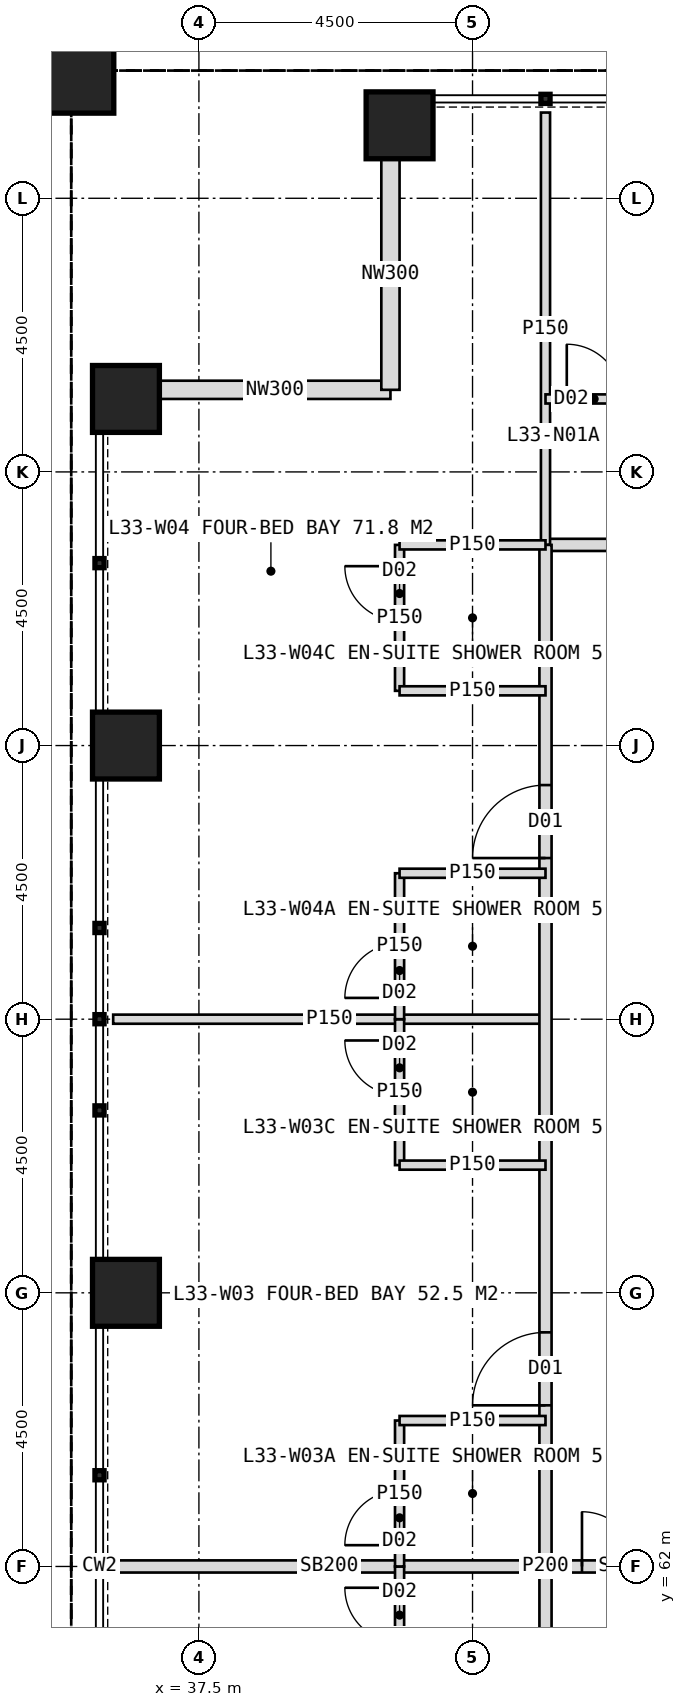
"""IFC4 building model, lengths in metres.
Left out: names, types, materials, properties, quantities, classifications, styles, units other than length and angle.
Written with IfcOpenShell. Run it as: python <this file> out.ifc"""

import sys

from ifc_helpers import new_model, si_unit, direction, frame, frame_2d, origin, origin_2d, place, context, subcontext, project, spatial, rectangle, hollow_rectangle, extrude, element, fill, save


model = new_model("IFC4")
c1 = context("Model", 3, precision=1e-05, world=origin(), true_north=direction((0.0, 1.0)))
c2 = subcontext(c1, "Body", "Model", "MODEL_VIEW")
j1 = project(units=[si_unit("LENGTHUNIT", "METRE"), si_unit("PLANEANGLEUNIT", "RADIAN")], contexts=[c1])
p1 = place(None, origin())
s1 = spatial("IfcSite", under=j1, at=p1, CompositionType="ELEMENT")
p2 = place(p1, origin())
s2 = spatial("IfcBuilding", under=s1, at=p2, CompositionType="ELEMENT")
p3 = place(p2, frame((0.0, 0.0, 140.0)))
s3 = spatial("IfcBuildingStorey", under=s2, at=p3, CompositionType="ELEMENT", Elevation=140.0)
for number, where, z_axis, x_axis in (
    (1, (40.8, 85.7, 0.0), (0.0, 0.0, 1.0), (1.0, 0.0, 0.0)),
    (2, (36.3, 66.5, 0.0), (0.0, 0.0, 1.0), (1.0, 0.0, 0.0)),
    (3, (36.3, 75.5, 0.0), (0.0, 0.0, 1.0), (1.0, 0.0, 0.0)),
    (4, (36.3, 81.2, 0.0), (0.0, 0.0, 1.0), (1.0, 0.0, 0.0)),
):
    element("IfcColumn", number, at=place(p3, frame(where, z_axis=z_axis, x_axis=x_axis)), inside=s3, PredefinedType="COLUMN", context=c2, shape_type="SweptSolid", body=[
        extrude(hollow_rectangle(XDim=1.1, YDim=1.1, WallThickness=0.1, at=origin_2d()), origin(), (0.0, 0.0, 1.0), 4.0),
    ])
p4 = place(p3, frame((35.4, 86.6, 0.0), z_axis=(0.0, 0.0, 1.0), x_axis=(1.0, 0.0, 0.0)))
e5 = element("IfcColumn", 5, at=p4, inside=s3, PredefinedType="COLUMN", context=c2, shape_type="SweptSolid", body=[
    extrude(hollow_rectangle(XDim=1.4, YDim=1.4, WallThickness=0.08, at=origin_2d()), origin(), (0.0, 0.0, 1.0), 4.0),
])
for number, where, z_axis, x_axis in (
    (6, (36.85, 81.35, 0.0), (0.0, 0.0, 1.0), (1.0, 0.0, 0.0)),
    (7, (40.65, 81.35, 0.0), (0.0, 0.0, 1.0), (0.0, 1.0, 0.0)),
):
    element("IfcWall", number, at=place(p3, frame(where, z_axis=z_axis, x_axis=x_axis)), inside=s3, PredefinedType="ELEMENTEDWALL", context=c2, shape_type="SweptSolid", body=[
        extrude(rectangle(XDim=3.8, YDim=0.3, at=frame_2d((1.9, 0.0))), origin(), (0.0, 0.0, 1.0), 4.0),
    ])
p5 = place(p3, frame((43.2, 78.8, 0.0), z_axis=(0.0, 0.0, 1.0), x_axis=(1.0, 0.0, 0.0)))
e8 = element("IfcWall", 8, at=p5, inside=s3, PredefinedType="PARTITIONING", context=c2, shape_type="SweptSolid", body=[
    extrude(rectangle(XDim=33.6, YDim=0.2, at=frame_2d((16.8, 0.0))), origin(), (0.0, 0.0, 1.0), 3.75),
])
p6 = place(p5, frame((3.25, 0.0, 0.0)))
e9 = element("IfcOpeningElement", 9, at=p6, cuts=e8, PredefinedType="OPENING", context=c2, shape_type="SweptSolid", body=[
    extrude(rectangle(XDim=1.2, YDim=2.2, at=frame_2d((0.6, 1.1))), frame((0.0, 0.11, 0.0), z_axis=(0.0, -1.0, 0.0), x_axis=(1.0, 0.0, 0.0)), (0.0, 0.0, 1.0), 0.22),
])
p7 = place(p5, frame((12.55, 0.0, 0.0)))
e10 = element("IfcOpeningElement", 10, at=p7, cuts=e8, PredefinedType="OPENING", context=c2, shape_type="SweptSolid", body=[
    extrude(rectangle(XDim=1.2, YDim=2.2, at=frame_2d((0.6, 1.1))), frame((0.0, 0.11, 0.0), z_axis=(0.0, -1.0, 0.0), x_axis=(1.0, 0.0, 0.0)), (0.0, 0.0, 1.0), 0.22),
])
p8 = place(p5, frame((26.95, 0.0, 0.0)))
e11 = element("IfcOpeningElement", 11, at=p8, cuts=e8, PredefinedType="OPENING", context=c2, shape_type="SweptSolid", body=[
    extrude(rectangle(XDim=1.2, YDim=2.2, at=frame_2d((0.6, 1.1))), frame((0.0, 0.11, 0.0), z_axis=(0.0, -1.0, 0.0), x_axis=(1.0, 0.0, 0.0)), (0.0, 0.0, 1.0), 0.22),
])
p9 = place(p3, frame((43.2, 78.8, 0.0), z_axis=(0.0, 0.0, 1.0), x_axis=(0.0, 1.0, 0.0)))
e12 = element("IfcWall", 12, at=p9, inside=s3, PredefinedType="PARTITIONING", context=c2, shape_type="SweptSolid", body=[
    extrude(rectangle(XDim=7.11, YDim=0.15, at=frame_2d((3.555, 0.0))), origin(), (0.0, 0.0, 1.0), 3.75),
])
p10 = place(p3, frame((43.2, 81.2, 0.0), z_axis=(0.0, 0.0, 1.0), x_axis=(1.0, 0.0, 0.0)))
e13 = element("IfcWall", 13, at=p10, inside=s3, PredefinedType="PARTITIONING", context=c2, shape_type="SweptSolid", body=[
    extrude(rectangle(XDim=3.0, YDim=0.15, at=frame_2d((1.5, 0.0))), origin(), (0.0, 0.0, 1.0), 2.997),
])
p11 = place(p10, frame((0.35, 0.0, 0.0)))
e14 = element("IfcOpeningElement", 14, at=p11, cuts=e13, PredefinedType="OPENING", context=c2, shape_type="SweptSolid", body=[
    extrude(rectangle(XDim=0.9, YDim=2.1, at=frame_2d((0.45, 1.05))), frame((0.0, 0.085, 0.0), z_axis=(0.0, -1.0, 0.0), x_axis=(1.0, 0.0, 0.0)), (0.0, 0.0, 1.0), 0.17),
])
p12 = place(p3, frame((43.2, 62.0, 0.0), z_axis=(0.0, 0.0, 1.0), x_axis=(-1.0, 0.0, 0.0)))
e15 = element("IfcWall", 15, at=p12, inside=s3, PredefinedType="SOLIDWALL", context=c2, shape_type="SweptSolid", body=[
    extrude(rectangle(XDim=7.11, YDim=0.2, at=frame_2d((3.555, 0.0))), origin(), (0.0, 0.0, 1.0), 2.95),
])
p13 = place(p3, frame((43.2, 71.0, 0.0), z_axis=(0.0, 0.0, 1.0), x_axis=(-1.0, 0.0, 0.0)))
e16 = element("IfcWall", 16, at=p13, inside=s3, PredefinedType="PARTITIONING", context=c2, shape_type="SweptSolid", body=[
    extrude(rectangle(XDim=7.11, YDim=0.15, at=frame_2d((3.555, 0.0))), origin(), (0.0, 0.0, 1.0), 3.75),
])
p14 = place(p3, frame((43.2, 45.2, 0.0), z_axis=(0.0, 0.0, 1.0), x_axis=(0.0, 1.0, 0.0)))
e17 = element("IfcWall", 17, at=p14, inside=s3, PredefinedType="PARTITIONING", context=c2, shape_type="SweptSolid", body=[
    extrude(rectangle(XDim=33.6, YDim=0.2, at=frame_2d((16.8, 0.0))), origin(), (0.0, 0.0, 1.0), 3.75),
])
p15 = place(p14, frame((2.65, 0.0, 0.0)))
e18 = element("IfcOpeningElement", 18, at=p15, cuts=e17, PredefinedType="OPENING", context=c2, shape_type="SweptSolid", body=[
    extrude(rectangle(XDim=1.2, YDim=2.2, at=frame_2d((0.6, 1.1))), frame((0.0, 0.11, 0.0), z_axis=(0.0, -1.0, 0.0), x_axis=(1.0, 0.0, 0.0)), (0.0, 0.0, 1.0), 0.22),
])
p16 = place(p14, frame((8.95, 0.0, 0.0)))
e19 = element("IfcOpeningElement", 19, at=p16, cuts=e17, PredefinedType="OPENING", context=c2, shape_type="SweptSolid", body=[
    extrude(rectangle(XDim=1.2, YDim=2.2, at=frame_2d((0.6, 1.1))), frame((0.0, 0.11, 0.0), z_axis=(0.0, -1.0, 0.0), x_axis=(1.0, 0.0, 0.0)), (0.0, 0.0, 1.0), 0.22),
])
p17 = place(p14, frame((19.45, 0.0, 0.0)))
e20 = element("IfcOpeningElement", 20, at=p17, cuts=e17, PredefinedType="OPENING", context=c2, shape_type="SweptSolid", body=[
    extrude(rectangle(XDim=1.2, YDim=2.2, at=frame_2d((0.6, 1.1))), frame((0.0, 0.11, 0.0), z_axis=(0.0, -1.0, 0.0), x_axis=(1.0, 0.0, 0.0)), (0.0, 0.0, 1.0), 0.22),
])
p18 = place(p14, frame((28.45, 0.0, 0.0)))
e21 = element("IfcOpeningElement", 21, at=p18, cuts=e17, PredefinedType="OPENING", context=c2, shape_type="SweptSolid", body=[
    extrude(rectangle(XDim=1.2, YDim=2.2, at=frame_2d((0.6, 1.1))), frame((0.0, 0.11, 0.0), z_axis=(0.0, -1.0, 0.0), x_axis=(1.0, 0.0, 0.0)), (0.0, 0.0, 1.0), 0.22),
])
p19 = place(p3, frame((40.8, 59.6, 0.0), z_axis=(0.0, 0.0, 1.0), x_axis=(0.0, 1.0, 0.0)))
e22 = element("IfcWall", 22, at=p19, inside=s3, PredefinedType="PARTITIONING", context=c2, shape_type="SweptSolid", body=[
    extrude(rectangle(XDim=2.4, YDim=0.15, at=frame_2d((1.2, 0.0))), origin(), (0.0, 0.0, 1.0), 3.75),
])
p20 = place(p19, frame((1.15, 0.0, 0.0)))
e23 = element("IfcOpeningElement", 23, at=p20, cuts=e22, PredefinedType="OPENING", context=c2, shape_type="SweptSolid", body=[
    extrude(rectangle(XDim=0.9, YDim=2.1, at=frame_2d((0.45, 1.05))), frame((0.0, 0.085, 0.0), z_axis=(0.0, -1.0, 0.0), x_axis=(1.0, 0.0, 0.0)), (0.0, 0.0, 1.0), 0.17),
])
p21 = place(p3, frame((40.8, 62.0, 0.0), z_axis=(0.0, 0.0, 1.0), x_axis=(0.0, 1.0, 0.0)))
e24 = element("IfcWall", 24, at=p21, inside=s3, PredefinedType="PARTITIONING", context=c2, shape_type="SweptSolid", body=[
    extrude(rectangle(XDim=2.4, YDim=0.15, at=frame_2d((1.2, 0.0))), origin(), (0.0, 0.0, 1.0), 3.75),
])
p22 = place(p21, frame((0.35, 0.0, 0.0)))
e25 = element("IfcOpeningElement", 25, at=p22, cuts=e24, PredefinedType="OPENING", context=c2, shape_type="SweptSolid", body=[
    extrude(rectangle(XDim=0.9, YDim=2.1, at=frame_2d((0.45, 1.05))), frame((0.0, 0.085, 0.0), z_axis=(0.0, -1.0, 0.0), x_axis=(1.0, 0.0, 0.0)), (0.0, 0.0, 1.0), 0.17),
])
p23 = place(p3, frame((43.2, 64.4, 0.0), z_axis=(0.0, 0.0, 1.0), x_axis=(-1.0, 0.0, 0.0)))
e26 = element("IfcWall", 26, at=p23, inside=s3, PredefinedType="PARTITIONING", context=c2, shape_type="SweptSolid", body=[
    extrude(rectangle(XDim=2.4, YDim=0.15, at=frame_2d((1.2, 0.0))), origin(), (0.0, 0.0, 1.0), 3.75),
])
p24 = place(p3, frame((40.8, 68.6, 0.0), z_axis=(0.0, 0.0, 1.0), x_axis=(0.0, 1.0, 0.0)))
e27 = element("IfcWall", 27, at=p24, inside=s3, PredefinedType="PARTITIONING", context=c2, shape_type="SweptSolid", body=[
    extrude(rectangle(XDim=2.4, YDim=0.15, at=frame_2d((1.2, 0.0))), origin(), (0.0, 0.0, 1.0), 3.75),
])
p25 = place(p24, frame((1.15, 0.0, 0.0)))
e28 = element("IfcOpeningElement", 28, at=p25, cuts=e27, PredefinedType="OPENING", context=c2, shape_type="SweptSolid", body=[
    extrude(rectangle(XDim=0.9, YDim=2.1, at=frame_2d((0.45, 1.05))), frame((0.0, 0.085, 0.0), z_axis=(0.0, -1.0, 0.0), x_axis=(1.0, 0.0, 0.0)), (0.0, 0.0, 1.0), 0.17),
])
p26 = place(p3, frame((43.2, 68.6, 0.0), z_axis=(0.0, 0.0, 1.0), x_axis=(-1.0, 0.0, 0.0)))
e29 = element("IfcWall", 29, at=p26, inside=s3, PredefinedType="PARTITIONING", context=c2, shape_type="SweptSolid", body=[
    extrude(rectangle(XDim=2.4, YDim=0.15, at=frame_2d((1.2, 0.0))), origin(), (0.0, 0.0, 1.0), 3.75),
])
p27 = place(p3, frame((40.8, 71.0, 0.0), z_axis=(0.0, 0.0, 1.0), x_axis=(0.0, 1.0, 0.0)))
e30 = element("IfcWall", 30, at=p27, inside=s3, PredefinedType="PARTITIONING", context=c2, shape_type="SweptSolid", body=[
    extrude(rectangle(XDim=2.4, YDim=0.15, at=frame_2d((1.2, 0.0))), origin(), (0.0, 0.0, 1.0), 3.75),
])
p28 = place(p27, frame((0.35, 0.0, 0.0)))
e31 = element("IfcOpeningElement", 31, at=p28, cuts=e30, PredefinedType="OPENING", context=c2, shape_type="SweptSolid", body=[
    extrude(rectangle(XDim=0.9, YDim=2.1, at=frame_2d((0.45, 1.05))), frame((0.0, 0.085, 0.0), z_axis=(0.0, -1.0, 0.0), x_axis=(1.0, 0.0, 0.0)), (0.0, 0.0, 1.0), 0.17),
])
p29 = place(p3, frame((43.2, 73.4, 0.0), z_axis=(0.0, 0.0, 1.0), x_axis=(-1.0, 0.0, 0.0)))
e32 = element("IfcWall", 32, at=p29, inside=s3, PredefinedType="PARTITIONING", context=c2, shape_type="SweptSolid", body=[
    extrude(rectangle(XDim=2.4, YDim=0.15, at=frame_2d((1.2, 0.0))), origin(), (0.0, 0.0, 1.0), 3.75),
])
p30 = place(p3, frame((40.8, 76.4, 0.0), z_axis=(0.0, 0.0, 1.0), x_axis=(0.0, 1.0, 0.0)))
e33 = element("IfcWall", 33, at=p30, inside=s3, PredefinedType="PARTITIONING", context=c2, shape_type="SweptSolid", body=[
    extrude(rectangle(XDim=2.4, YDim=0.15, at=frame_2d((1.2, 0.0))), origin(), (0.0, 0.0, 1.0), 2.997),
])
p31 = place(p30, frame((1.15, 0.0, 0.0)))
e34 = element("IfcOpeningElement", 34, at=p31, cuts=e33, PredefinedType="OPENING", context=c2, shape_type="SweptSolid", body=[
    extrude(rectangle(XDim=0.9, YDim=2.1, at=frame_2d((0.45, 1.05))), frame((0.0, 0.085, 0.0), z_axis=(0.0, -1.0, 0.0), x_axis=(1.0, 0.0, 0.0)), (0.0, 0.0, 1.0), 0.17),
])
for number, where, z_axis, x_axis in (
    (35, (43.2, 76.4, 0.0), (0.0, 0.0, 1.0), (-1.0, 0.0, 0.0)),
    (36, (43.2, 78.8, 0.0), (0.0, 0.0, 1.0), (-1.0, 0.0, 0.0)),
):
    element("IfcWall", number, at=place(p3, frame(where, z_axis=z_axis, x_axis=x_axis)), inside=s3, PredefinedType="PARTITIONING", context=c2, shape_type="SweptSolid", body=[
        extrude(rectangle(XDim=2.4, YDim=0.15, at=frame_2d((1.2, 0.0))), origin(), (0.0, 0.0, 1.0), 3.75),
    ])
p32 = place(p3, frame((45.9, 62.0, 0.0), z_axis=(0.0, 0.0, 1.0), x_axis=(-1.0, 0.0, 0.0)))
e37 = element("IfcWall", 37, at=p32, inside=s3, PredefinedType="SOLIDWALL", context=c2, shape_type="SweptSolid", body=[
    extrude(rectangle(XDim=2.7, YDim=0.2, at=frame_2d((1.35, 0.0))), origin(), (0.0, 0.0, 1.0), 2.95),
])
p33 = place(p32, frame((0.3, 0.0, 0.0)))
e38 = element("IfcOpeningElement", 38, at=p33, cuts=e37, PredefinedType="OPENING", context=c2, shape_type="SweptSolid", body=[
    extrude(rectangle(XDim=1.8, YDim=2.2, at=frame_2d((0.9, 1.1))), frame((0.0, 0.11, 0.0), z_axis=(0.0, -1.0, 0.0), x_axis=(1.0, 0.0, 0.0)), (0.0, 0.0, 1.0), 0.22),
])
p34 = place(p11, origin())
e39 = element("IfcDoor", 39, at=p34, inside=s3, OperationType="SINGLE_SWING_LEFT", PredefinedType="DOOR", context=c2, shape_type="SweptSolid", body=[
    extrude(rectangle(XDim=0.9, YDim=2.1, at=frame_2d((0.45, 1.05))), frame((0.0, 0.025, 0.0), z_axis=(0.0, -1.0, 0.0), x_axis=(1.0, 0.0, 0.0)), (0.0, 0.0, 1.0), 0.05),
])
fill(e14, e39)
p35 = place(p20, origin())
e40 = element("IfcDoor", 40, at=p35, inside=s3, OperationType="SINGLE_SWING_RIGHT", PredefinedType="DOOR", context=c2, shape_type="SweptSolid", body=[
    extrude(rectangle(XDim=0.9, YDim=2.1, at=frame_2d((0.45, 1.05))), frame((0.0, 0.025, 0.0), z_axis=(0.0, -1.0, 0.0), x_axis=(1.0, 0.0, 0.0)), (0.0, 0.0, 1.0), 0.05),
])
fill(e23, e40)
p36 = place(p17, origin())
e41 = element("IfcDoor", 41, at=p36, inside=s3, OperationType="SINGLE_SWING_LEFT", PredefinedType="DOOR", context=c2, shape_type="SweptSolid", body=[
    extrude(rectangle(XDim=1.2, YDim=2.2, at=frame_2d((0.6, 1.1))), frame((0.0, 0.025, 0.0), z_axis=(0.0, -1.0, 0.0), x_axis=(1.0, 0.0, 0.0)), (0.0, 0.0, 1.0), 0.05),
])
fill(e20, e41)
p37 = place(p22, origin())
e42 = element("IfcDoor", 42, at=p37, inside=s3, OperationType="SINGLE_SWING_LEFT", PredefinedType="DOOR", context=c2, shape_type="SweptSolid", body=[
    extrude(rectangle(XDim=0.9, YDim=2.1, at=frame_2d((0.45, 1.05))), frame((0.0, 0.025, 0.0), z_axis=(0.0, -1.0, 0.0), x_axis=(1.0, 0.0, 0.0)), (0.0, 0.0, 1.0), 0.05),
])
fill(e25, e42)
p38 = place(p25, origin())
e43 = element("IfcDoor", 43, at=p38, inside=s3, OperationType="SINGLE_SWING_RIGHT", PredefinedType="DOOR", context=c2, shape_type="SweptSolid", body=[
    extrude(rectangle(XDim=0.9, YDim=2.1, at=frame_2d((0.45, 1.05))), frame((0.0, 0.025, 0.0), z_axis=(0.0, -1.0, 0.0), x_axis=(1.0, 0.0, 0.0)), (0.0, 0.0, 1.0), 0.05),
])
fill(e28, e43)
p39 = place(p18, origin())
e44 = element("IfcDoor", 44, at=p39, inside=s3, OperationType="SINGLE_SWING_LEFT", PredefinedType="DOOR", context=c2, shape_type="SweptSolid", body=[
    extrude(rectangle(XDim=1.2, YDim=2.2, at=frame_2d((0.6, 1.1))), frame((0.0, 0.025, 0.0), z_axis=(0.0, -1.0, 0.0), x_axis=(1.0, 0.0, 0.0)), (0.0, 0.0, 1.0), 0.05),
])
fill(e21, e44)
p40 = place(p28, origin())
e45 = element("IfcDoor", 45, at=p40, inside=s3, OperationType="SINGLE_SWING_LEFT", PredefinedType="DOOR", context=c2, shape_type="SweptSolid", body=[
    extrude(rectangle(XDim=0.9, YDim=2.1, at=frame_2d((0.45, 1.05))), frame((0.0, 0.025, 0.0), z_axis=(0.0, -1.0, 0.0), x_axis=(1.0, 0.0, 0.0)), (0.0, 0.0, 1.0), 0.05),
])
fill(e31, e45)
p41 = place(p31, origin())
e46 = element("IfcDoor", 46, at=p41, inside=s3, OperationType="SINGLE_SWING_RIGHT", PredefinedType="DOOR", context=c2, shape_type="SweptSolid", body=[
    extrude(rectangle(XDim=0.9, YDim=2.1, at=frame_2d((0.45, 1.05))), frame((0.0, 0.025, 0.0), z_axis=(0.0, -1.0, 0.0), x_axis=(1.0, 0.0, 0.0)), (0.0, 0.0, 1.0), 0.05),
])
fill(e34, e46)
p42 = place(p33, origin())
e47 = element("IfcDoor", 47, at=p42, inside=s3, OperationType="DOUBLE_DOOR_DOUBLE_SWING", PredefinedType="DOOR", context=c2, shape_type="SweptSolid", body=[
    extrude(rectangle(XDim=1.8, YDim=2.2, at=frame_2d((0.9, 1.1))), frame((0.0, 0.025, 0.0), z_axis=(0.0, -1.0, 0.0), x_axis=(1.0, 0.0, 0.0)), (0.0, 0.0, 1.0), 0.05),
])
fill(e38, e47)
save(model, sys.argv[1])
